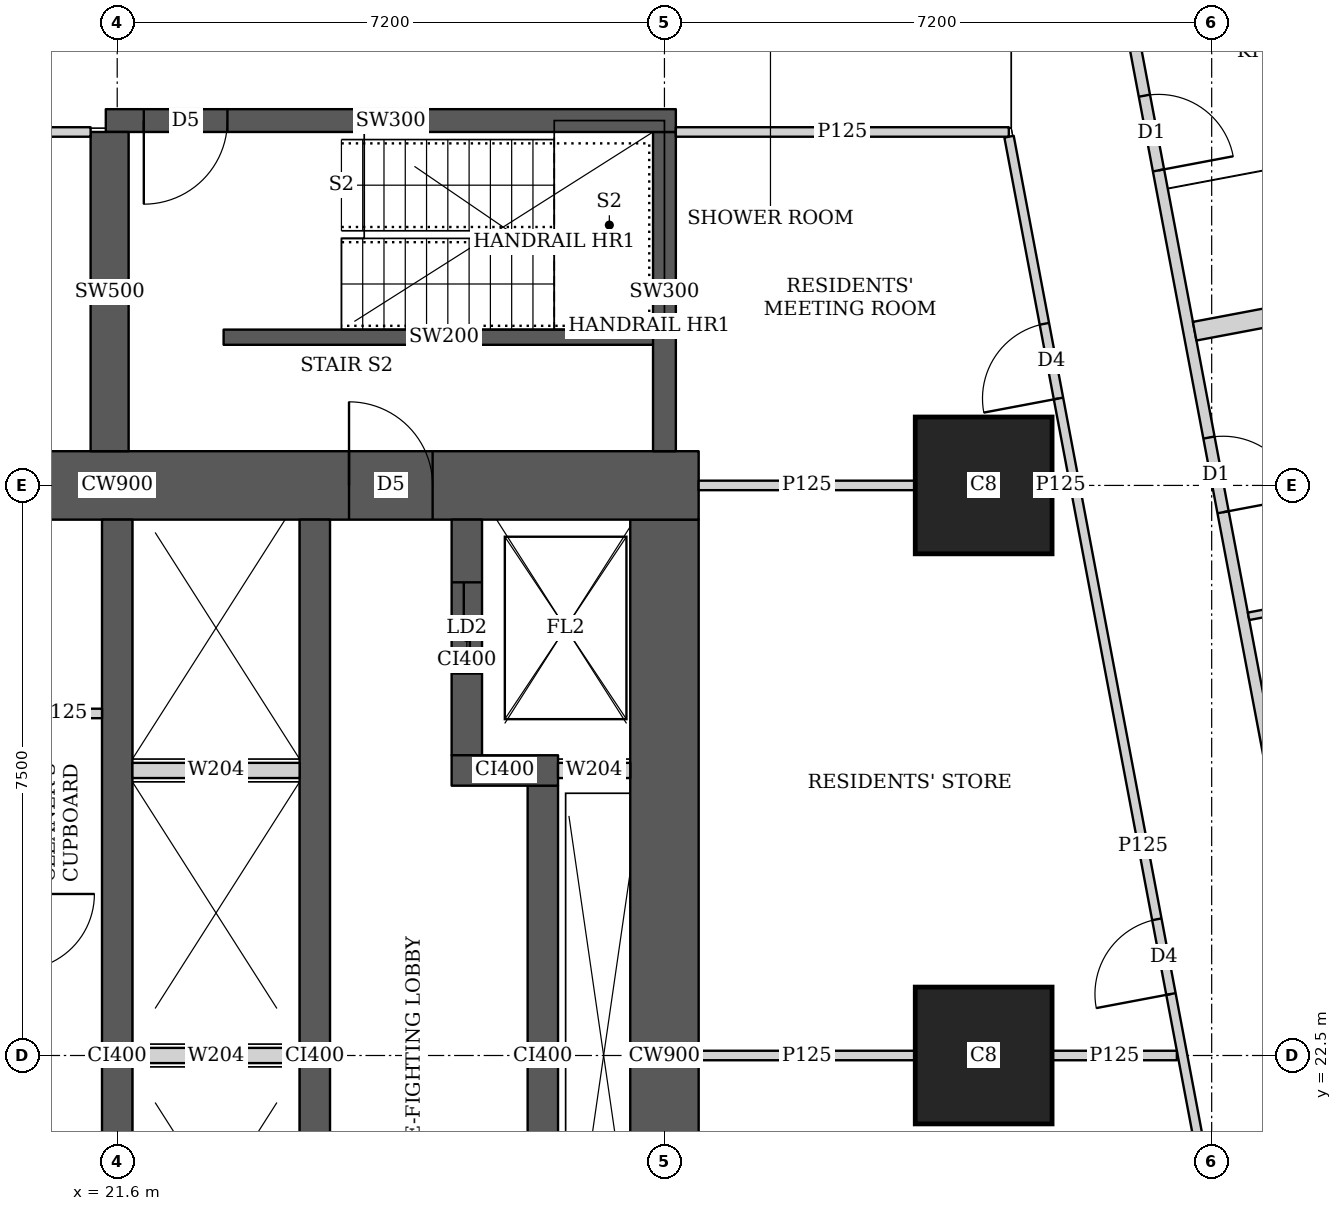
"""IFC4 building model, lengths in metres.
Left out: names, types, materials, properties, quantities, classifications, styles, units other than length and angle.
Written with IfcOpenShell. Run it as: python <this file> out.ifc"""

import sys

from ifc_helpers import new_model, si_unit, direction, frame, frame_2d, origin, origin_2d, place, context, subcontext, project, spatial, rectangle, extrude, element, fill, save


model = new_model("IFC4")
c1 = context("Model", 3, precision=1e-05, world=origin(), true_north=direction((0.0, 1.0)))
c2 = subcontext(c1, "Body", "Model", "MODEL_VIEW")
j1 = project(units=[si_unit("LENGTHUNIT", "METRE"), si_unit("PLANEANGLEUNIT", "RADIAN")], contexts=[c1])
p1 = place(None, origin())
s1 = spatial("IfcSite", under=j1, at=p1, CompositionType="ELEMENT")
p2 = place(p1, origin())
s2 = spatial("IfcBuilding", under=s1, at=p2, CompositionType="ELEMENT")
p3 = place(p2, frame((0.0, 0.0, 42.5)))
s3 = spatial("IfcBuildingStorey", under=s2, at=p3, CompositionType="ELEMENT", Elevation=42.5)
for number, where, z_axis, x_axis in (
    (1, (33.0, 22.5, 0.0), (0.0, 0.0, 1.0), (1.0, 0.0, 0.0)),
    (2, (33.0, 30.0, 0.0), (0.0, 0.0, 1.0), (1.0, 0.0, 0.0)),
):
    element("IfcColumn", number, at=place(p3, frame(where, z_axis=z_axis, x_axis=x_axis)), inside=s3, PredefinedType="COLUMN", context=c2, shape_type="SweptSolid", body=[
        extrude(rectangle(XDim=1.8, YDim=1.8, at=origin_2d()), origin(), (0.0, 0.0, 1.0), 3.75),
    ])
p4 = place(p3, frame((13.95, 30.0, 0.0), z_axis=(0.0, 0.0, 1.0), x_axis=(1.0, 0.0, 0.0)))
e3 = element("IfcWall", 3, at=p4, inside=s3, PredefinedType="SHEAR", context=c2, shape_type="SweptSolid", body=[
    extrude(rectangle(XDim=15.3, YDim=0.9, at=frame_2d((7.65, 0.0))), origin(), (0.0, 0.0, 1.0), 3.75),
])
p5 = place(p4, frame((4.45, 0.0, 0.0)))
e4 = element("IfcOpeningElement", 4, at=p5, cuts=e3, PredefinedType="OPENING", context=c2, shape_type="SweptSolid", body=[
    extrude(rectangle(XDim=1.8, YDim=2.1, at=frame_2d((0.9, 1.05))), frame((0.0, 0.46, 0.0), z_axis=(0.0, -1.0, 0.0), x_axis=(1.0, 0.0, 0.0)), (0.0, 0.0, 1.0), 0.92),
])
p6 = place(p4, frame((10.7, 0.0, 0.0)))
e5 = element("IfcOpeningElement", 5, at=p6, cuts=e3, PredefinedType="OPENING", context=c2, shape_type="SweptSolid", body=[
    extrude(rectangle(XDim=1.1, YDim=2.1, at=frame_2d((0.55, 1.05))), frame((0.0, 0.46, 0.0), z_axis=(0.0, -1.0, 0.0), x_axis=(1.0, 0.0, 0.0)), (0.0, 0.0, 1.0), 0.92),
])
p7 = place(p3, frame((28.8, 15.45, 0.0), z_axis=(0.0, 0.0, 1.0), x_axis=(0.0, 1.0, 0.0)))
e6 = element("IfcWall", 6, at=p7, inside=s3, PredefinedType="SHEAR", context=c2, shape_type="SweptSolid", body=[
    extrude(rectangle(XDim=14.1, YDim=0.9, at=frame_2d((7.05, 0.0))), origin(), (0.0, 0.0, 1.0), 3.75),
])
for number, where, z_axis, x_axis in (
    (7, (21.6, 15.45, 0.0), (0.0, 0.0, 1.0), (0.0, 1.0, 0.0)),
    (8, (24.2, 15.45, 0.0), (0.0, 0.0, 1.0), (0.0, 1.0, 0.0)),
):
    element("IfcWall", number, at=place(p3, frame(where, z_axis=z_axis, x_axis=x_axis)), inside=s3, PredefinedType="SHEAR", context=c2, shape_type="SweptSolid", body=[
        extrude(rectangle(XDim=14.1, YDim=0.4, at=frame_2d((7.05, 0.0))), origin(), (0.0, 0.0, 1.0), 3.75),
    ])
p8 = place(p3, frame((27.2, 18.95, 0.0), z_axis=(0.0, 0.0, 1.0), x_axis=(0.0, 1.0, 0.0)))
e9 = element("IfcWall", 9, at=p8, inside=s3, PredefinedType="SHEAR", context=c2, shape_type="SweptSolid", body=[
    extrude(rectangle(XDim=7.1, YDim=0.4, at=frame_2d((3.55, 0.0))), origin(), (0.0, 0.0, 1.0), 3.75),
])
p9 = place(p3, frame((26.0, 26.25, 0.0), z_axis=(0.0, 0.0, 1.0), x_axis=(1.0, 0.0, 0.0)))
e10 = element("IfcWall", 10, at=p9, inside=s3, PredefinedType="SHEAR", context=c2, shape_type="SweptSolid", body=[
    extrude(rectangle(XDim=1.4, YDim=0.4, at=frame_2d((0.7, 0.0))), origin(), (0.0, 0.0, 1.0), 3.75),
])
p10 = place(p3, frame((26.2, 26.45, 0.0), z_axis=(0.0, 0.0, 1.0), x_axis=(0.0, 1.0, 0.0)))
e11 = element("IfcWall", 11, at=p10, inside=s3, PredefinedType="SHEAR", context=c2, shape_type="SweptSolid", body=[
    extrude(rectangle(XDim=3.1, YDim=0.4, at=frame_2d((1.55, 0.0))), origin(), (0.0, 0.0, 1.0), 3.75),
])
p11 = place(p10, frame((1.075, 0.0, 0.0)))
e12 = element("IfcOpeningElement", 12, at=p11, cuts=e11, PredefinedType="OPENING", context=c2, shape_type="SweptSolid", body=[
    extrude(rectangle(XDim=1.2, YDim=2.1, at=frame_2d((0.6, 1.05))), frame((0.0, 0.21, 0.0), z_axis=(0.0, -1.0, 0.0), x_axis=(1.0, 0.0, 0.0)), (0.0, 0.0, 1.0), 0.42),
])
p12 = place(p3, frame((21.45, 34.8, 0.0), z_axis=(0.0, 0.0, 1.0), x_axis=(1.0, 0.0, 0.0)))
e13 = element("IfcWall", 13, at=p12, inside=s3, PredefinedType="SHEAR", context=c2, shape_type="SweptSolid", body=[
    extrude(rectangle(XDim=7.5, YDim=0.3, at=frame_2d((3.75, 0.0))), origin(), (0.0, 0.0, 1.0), 3.75),
])
p13 = place(p12, frame((0.5, 0.0, 0.0)))
e14 = element("IfcOpeningElement", 14, at=p13, cuts=e13, PredefinedType="OPENING", context=c2, shape_type="SweptSolid", body=[
    extrude(rectangle(XDim=1.1, YDim=2.1, at=frame_2d((0.55, 1.05))), frame((0.0, 0.16, 0.0), z_axis=(0.0, -1.0, 0.0), x_axis=(1.0, 0.0, 0.0)), (0.0, 0.0, 1.0), 0.32),
])
p14 = place(p3, frame((21.5, 30.45, 0.0), z_axis=(0.0, 0.0, 1.0), x_axis=(0.0, 1.0, 0.0)))
e15 = element("IfcWall", 15, at=p14, inside=s3, PredefinedType="SHEAR", context=c2, shape_type="SweptSolid", body=[
    extrude(rectangle(XDim=4.2, YDim=0.5, at=frame_2d((2.1, 0.0))), origin(), (0.0, 0.0, 1.0), 3.75),
])
p15 = place(p3, frame((28.8, 30.45, 0.0), z_axis=(0.0, 0.0, 1.0), x_axis=(0.0, 1.0, 0.0)))
e16 = element("IfcWall", 16, at=p15, inside=s3, PredefinedType="SHEAR", context=c2, shape_type="SweptSolid", body=[
    extrude(rectangle(XDim=4.2, YDim=0.3, at=frame_2d((2.1, 0.0))), origin(), (0.0, 0.0, 1.0), 3.75),
])
p16 = place(p3, frame((33.68, 42.723, 0.0), z_axis=(0.0, 0.0, 1.0), x_axis=(0.185624129307, -0.98262082342, 0.0)))
e17 = element("IfcWall", 17, at=p16, inside=s3, PredefinedType="SOLIDWALL", context=c2, shape_type="SweptSolid", body=[
    extrude(rectangle(XDim=41.051, YDim=0.15, at=frame_2d((20.526, 0.0))), origin(), (0.0, 0.0, 1.0), 2.5),
])
p17 = place(p16, frame((7.73, 0.0, 0.0)))
e18 = element("IfcOpeningElement", 18, at=p17, cuts=e17, PredefinedType="OPENING", context=c2, shape_type="SweptSolid", body=[
    extrude(rectangle(XDim=1.0, YDim=2.1, at=frame_2d((0.5, 1.05))), frame((0.0, 0.085, 0.0), z_axis=(0.0, -1.0, 0.0), x_axis=(1.0, 0.0, 0.0)), (0.0, 0.0, 1.0), 0.17),
])
p18 = place(p16, frame((12.307, 0.0, 0.0)))
e19 = element("IfcOpeningElement", 19, at=p18, cuts=e17, PredefinedType="OPENING", context=c2, shape_type="SweptSolid", body=[
    extrude(rectangle(XDim=1.0, YDim=2.1, at=frame_2d((0.5, 1.05))), frame((0.0, 0.085, 0.0), z_axis=(0.0, -1.0, 0.0), x_axis=(1.0, 0.0, 0.0)), (0.0, 0.0, 1.0), 0.17),
])
p19 = place(p16, frame((19.938, 0.0, 0.0)))
e20 = element("IfcOpeningElement", 20, at=p19, cuts=e17, PredefinedType="OPENING", context=c2, shape_type="SweptSolid", body=[
    extrude(rectangle(XDim=1.0, YDim=2.1, at=frame_2d((0.5, 1.05))), frame((0.0, 0.085, 0.0), z_axis=(0.0, -1.0, 0.0), x_axis=(1.0, 0.0, 0.0)), (0.0, 0.0, 1.0), 0.17),
])
p20 = place(p16, frame((32.193, 0.0, 0.0)))
e21 = element("IfcOpeningElement", 21, at=p20, cuts=e17, PredefinedType="OPENING", context=c2, shape_type="SweptSolid", body=[
    extrude(rectangle(XDim=1.0, YDim=2.1, at=frame_2d((0.5, 1.05))), frame((0.0, 0.085, 0.0), z_axis=(0.0, -1.0, 0.0), x_axis=(1.0, 0.0, 0.0)), (0.0, 0.0, 1.0), 0.17),
])
p21 = place(p3, frame((39.948, 28.933, 0.0), z_axis=(0.0, 0.0, 1.0), x_axis=(-0.982576058723, -0.185860939478, 0.0)))
e22 = element("IfcWall", 22, at=p21, inside=s3, PredefinedType="PARTITIONING", context=c2, shape_type="SweptSolid", body=[
    extrude(rectangle(XDim=3.524, YDim=0.1, at=frame_2d((1.762, 0.0))), origin(), (0.0, 0.0, 1.0), 3.5),
])
p22 = place(p3, frame((40.468, 32.915, 0.0), z_axis=(0.0, 0.0, 1.0), x_axis=(-0.982635807605, -0.185544791394, 0.0)))
e23 = element("IfcWall", 23, at=p22, inside=s3, PredefinedType="SOLIDWALL", context=c2, shape_type="SweptSolid", body=[
    extrude(rectangle(XDim=4.775, YDim=0.25, at=frame_2d((2.388, 0.0))), origin(), (0.0, 0.0, 1.0), 3.5),
])
p23 = place(p3, frame((10.413, 34.65, 0.0), z_axis=(0.0, 0.0, 1.0), x_axis=(1.0, 0.0, 0.0)))
e24 = element("IfcWall", 24, at=p23, inside=s3, PredefinedType="PARTITIONING", context=c2, shape_type="SweptSolid", body=[
    extrude(rectangle(XDim=10.837, YDim=0.125, at=frame_2d((5.418, 0.0))), origin(), (0.0, 0.0, 1.0), 3.5),
])
p24 = place(p23, frame((7.487, 0.0, 0.0)))
e25 = element("IfcOpeningElement", 25, at=p24, cuts=e24, PredefinedType="OPENING", context=c2, shape_type="SweptSolid", body=[
    extrude(rectangle(XDim=1.8, YDim=2.1, at=frame_2d((0.9, 1.05))), frame((0.0, 0.073, 0.0), z_axis=(0.0, -1.0, 0.0), x_axis=(1.0, 0.0, 0.0)), (0.0, 0.0, 1.0), 0.145),
])
p25 = place(p3, frame((28.95, 34.65, 0.0), z_axis=(0.0, 0.0, 1.0), x_axis=(1.0, 0.0, 0.0)))
e26 = element("IfcWall", 26, at=p25, inside=s3, PredefinedType="PARTITIONING", context=c2, shape_type="SweptSolid", body=[
    extrude(rectangle(XDim=4.381, YDim=0.125, at=frame_2d((2.19, 0.0))), origin(), (0.0, 0.0, 1.0), 3.5),
])
p26 = place(p3, frame((36.861, 15.913, 0.0), z_axis=(0.0, 0.0, 1.0), x_axis=(-0.185588307143, 0.982627589808, 0.0)))
e27 = element("IfcWall", 27, at=p26, inside=s3, PredefinedType="PARTITIONING", context=c2, shape_type="SweptSolid", body=[
    extrude(rectangle(XDim=19.005, YDim=0.125, at=frame_2d((9.502, 0.0))), origin(), (0.0, 0.0, 1.0), 2.5),
])
p27 = place(p26, frame((0.25, 0.0, 0.0)))
e28 = element("IfcOpeningElement", 28, at=p27, cuts=e27, PredefinedType="OPENING", context=c2, shape_type="SweptSolid", body=[
    extrude(rectangle(XDim=1.0, YDim=2.1, at=frame_2d((0.5, 1.05))), frame((0.0, 0.073, 0.0), z_axis=(0.0, -1.0, 0.0), x_axis=(1.0, 0.0, 0.0)), (0.0, 0.0, 1.0), 0.145),
])
p28 = place(p26, frame((7.527, 0.0, 0.0)))
e29 = element("IfcOpeningElement", 29, at=p28, cuts=e27, PredefinedType="OPENING", context=c2, shape_type="SweptSolid", body=[
    extrude(rectangle(XDim=1.0, YDim=2.1, at=frame_2d((0.5, 1.05))), frame((0.0, 0.073, 0.0), z_axis=(0.0, -1.0, 0.0), x_axis=(1.0, 0.0, 0.0)), (0.0, 0.0, 1.0), 0.145),
])
p29 = place(p26, frame((15.5, 0.0, 0.0)))
e30 = element("IfcOpeningElement", 30, at=p29, cuts=e27, PredefinedType="OPENING", context=c2, shape_type="SweptSolid", body=[
    extrude(rectangle(XDim=1.0, YDim=2.1, at=frame_2d((0.5, 1.05))), frame((0.0, 0.073, 0.0), z_axis=(0.0, -1.0, 0.0), x_axis=(1.0, 0.0, 0.0)), (0.0, 0.0, 1.0), 0.145),
])
p30 = place(p3, frame((29.25, 22.5, 0.0), z_axis=(0.0, 0.0, 1.0), x_axis=(1.0, 0.0, 0.0)))
e31 = element("IfcWall", 31, at=p30, inside=s3, PredefinedType="PARTITIONING", context=c2, shape_type="SweptSolid", body=[
    extrude(rectangle(XDim=2.849, YDim=0.125, at=frame_2d((1.425, 0.0))), origin(), (0.0, 0.0, 1.0), 3.5),
])
p31 = place(p3, frame((33.901, 22.5, 0.0), z_axis=(0.0, 0.0, 1.0), x_axis=(1.0, 0.0, 0.0)))
e32 = element("IfcWall", 32, at=p31, inside=s3, PredefinedType="PARTITIONING", context=c2, shape_type="SweptSolid", body=[
    extrude(rectangle(XDim=1.641, YDim=0.125, at=frame_2d((0.821, 0.0))), origin(), (0.0, 0.0, 1.0), 2.5),
])
p32 = place(p3, frame((29.25, 30.0, 0.0), z_axis=(0.0, 0.0, 1.0), x_axis=(1.0, 0.0, 0.0)))
e33 = element("IfcWall", 33, at=p32, inside=s3, PredefinedType="PARTITIONING", context=c2, shape_type="SweptSolid", body=[
    extrude(rectangle(XDim=2.849, YDim=0.125, at=frame_2d((1.425, 0.0))), origin(), (0.0, 0.0, 1.0), 3.5),
])
p33 = place(p3, frame((33.901, 30.0, 0.0), z_axis=(0.0, 0.0, 1.0), x_axis=(1.0, 0.0, 0.0)))
e34 = element("IfcWall", 34, at=p33, inside=s3, PredefinedType="PARTITIONING", context=c2, shape_type="SweptSolid", body=[
    extrude(rectangle(XDim=0.224, YDim=0.125, at=frame_2d((0.112, 0.0))), origin(), (0.0, 0.0, 1.0), 2.5),
])
p34 = place(p3, frame((20.363, 27.0, 0.0), z_axis=(0.0, 0.0, 1.0), x_axis=(1.0, 0.0, 0.0)))
e35 = element("IfcWall", 35, at=p34, inside=s3, PredefinedType="PARTITIONING", context=c2, shape_type="SweptSolid", body=[
    extrude(rectangle(XDim=1.037, YDim=0.125, at=frame_2d((0.519, 0.0))), origin(), (0.0, 0.0, 1.0), 3.5),
])
p35 = place(p3, frame((23.0, 31.95, 0.0), z_axis=(0.0, 0.0, 1.0), x_axis=(1.0, 0.0, 0.0)))
e36 = element("IfcWall", 36, at=p35, inside=s3, PredefinedType="SHEAR", context=c2, shape_type="SweptSolid", body=[
    extrude(rectangle(XDim=5.8, YDim=0.2, at=frame_2d((2.9, 0.0))), origin(), (0.0, 0.0, 1.0), 3.75),
])
for number, where, z_axis, x_axis in (
    (37, (21.8, 22.5, 0.0), (0.0, 0.0, 1.0), (1.0, 0.0, 0.0)),
    (38, (21.8, 26.25, 0.0), (0.0, 0.0, 1.0), (1.0, 0.0, 0.0)),
):
    element("IfcWall", number, at=place(p3, frame(where, z_axis=z_axis, x_axis=x_axis)), inside=s3, PredefinedType="SOLIDWALL", context=c2, shape_type="SweptSolid", body=[
        extrude(rectangle(XDim=2.2, YDim=0.2, at=frame_2d((1.1, 0.0))), origin(), (0.0, 0.0, 1.0), 3.5),
    ])
p36 = place(p3, frame((27.4, 26.25, 0.0), z_axis=(0.0, 0.0, 1.0), x_axis=(1.0, 0.0, 0.0)))
e39 = element("IfcWall", 39, at=p36, inside=s3, PredefinedType="SOLIDWALL", context=c2, shape_type="SweptSolid", body=[
    extrude(rectangle(XDim=0.95, YDim=0.2, at=frame_2d((0.475, 0.0))), origin(), (0.0, 0.0, 1.0), 3.5),
])
p37 = place(p17, origin())
e40 = element("IfcDoor", 40, at=p37, inside=s3, OperationType="SINGLE_SWING_RIGHT", PredefinedType="DOOR", context=c2, shape_type="SweptSolid", body=[
    extrude(rectangle(XDim=1.0, YDim=2.1, at=frame_2d((0.5, 1.05))), frame((0.0, 0.025, 0.0), z_axis=(0.0, -1.0, 0.0), x_axis=(1.0, 0.0, 0.0)), (0.0, 0.0, 1.0), 0.05),
])
fill(e18, e40)
p38 = place(p18, origin())
e41 = element("IfcDoor", 41, at=p38, inside=s3, OperationType="SINGLE_SWING_RIGHT", PredefinedType="DOOR", context=c2, shape_type="SweptSolid", body=[
    extrude(rectangle(XDim=1.0, YDim=2.1, at=frame_2d((0.5, 1.05))), frame((0.0, 0.025, 0.0), z_axis=(0.0, -1.0, 0.0), x_axis=(1.0, 0.0, 0.0)), (0.0, 0.0, 1.0), 0.05),
])
fill(e19, e41)
p39 = place(p28, origin())
e42 = element("IfcDoor", 42, at=p39, inside=s3, OperationType="SINGLE_SWING_LEFT", PredefinedType="DOOR", context=c2, shape_type="SweptSolid", body=[
    extrude(rectangle(XDim=1.0, YDim=2.1, at=frame_2d((0.5, 1.05))), frame((0.0, 0.025, 0.0), z_axis=(0.0, -1.0, 0.0), x_axis=(1.0, 0.0, 0.0)), (0.0, 0.0, 1.0), 0.05),
])
fill(e29, e42)
p40 = place(p29, origin())
e43 = element("IfcDoor", 43, at=p40, inside=s3, OperationType="SINGLE_SWING_LEFT", PredefinedType="DOOR", context=c2, shape_type="SweptSolid", body=[
    extrude(rectangle(XDim=1.0, YDim=2.1, at=frame_2d((0.5, 1.05))), frame((0.0, 0.025, 0.0), z_axis=(0.0, -1.0, 0.0), x_axis=(1.0, 0.0, 0.0)), (0.0, 0.0, 1.0), 0.05),
])
fill(e30, e43)
p41 = place(p6, origin())
e44 = element("IfcDoor", 44, at=p41, inside=s3, OperationType="SINGLE_SWING_LEFT", PredefinedType="DOOR", context=c2, shape_type="SweptSolid", body=[
    extrude(rectangle(XDim=1.1, YDim=2.1, at=frame_2d((0.55, 1.05))), frame((0.0, 0.025, 0.0), z_axis=(0.0, -1.0, 0.0), x_axis=(1.0, 0.0, 0.0)), (0.0, 0.0, 1.0), 0.05),
])
fill(e5, e44)
p42 = place(p11, origin())
e45 = element("IfcDoor", 45, at=p42, inside=s3, OperationType="DOUBLE_DOOR_SLIDING", PredefinedType="DOOR", context=c2, shape_type="SweptSolid", body=[
    extrude(rectangle(XDim=1.2, YDim=2.1, at=frame_2d((0.6, 1.05))), frame((0.0, 0.025, 0.0), z_axis=(0.0, -1.0, 0.0), x_axis=(1.0, 0.0, 0.0)), (0.0, 0.0, 1.0), 0.05),
])
fill(e12, e45)
p43 = place(p13, origin())
e46 = element("IfcDoor", 46, at=p43, inside=s3, OperationType="SINGLE_SWING_RIGHT", PredefinedType="DOOR", context=c2, shape_type="SweptSolid", body=[
    extrude(rectangle(XDim=1.1, YDim=2.1, at=frame_2d((0.55, 1.05))), frame((0.0, 0.025, 0.0), z_axis=(0.0, -1.0, 0.0), x_axis=(1.0, 0.0, 0.0)), (0.0, 0.0, 1.0), 0.05),
])
fill(e14, e46)
save(model, sys.argv[1])
